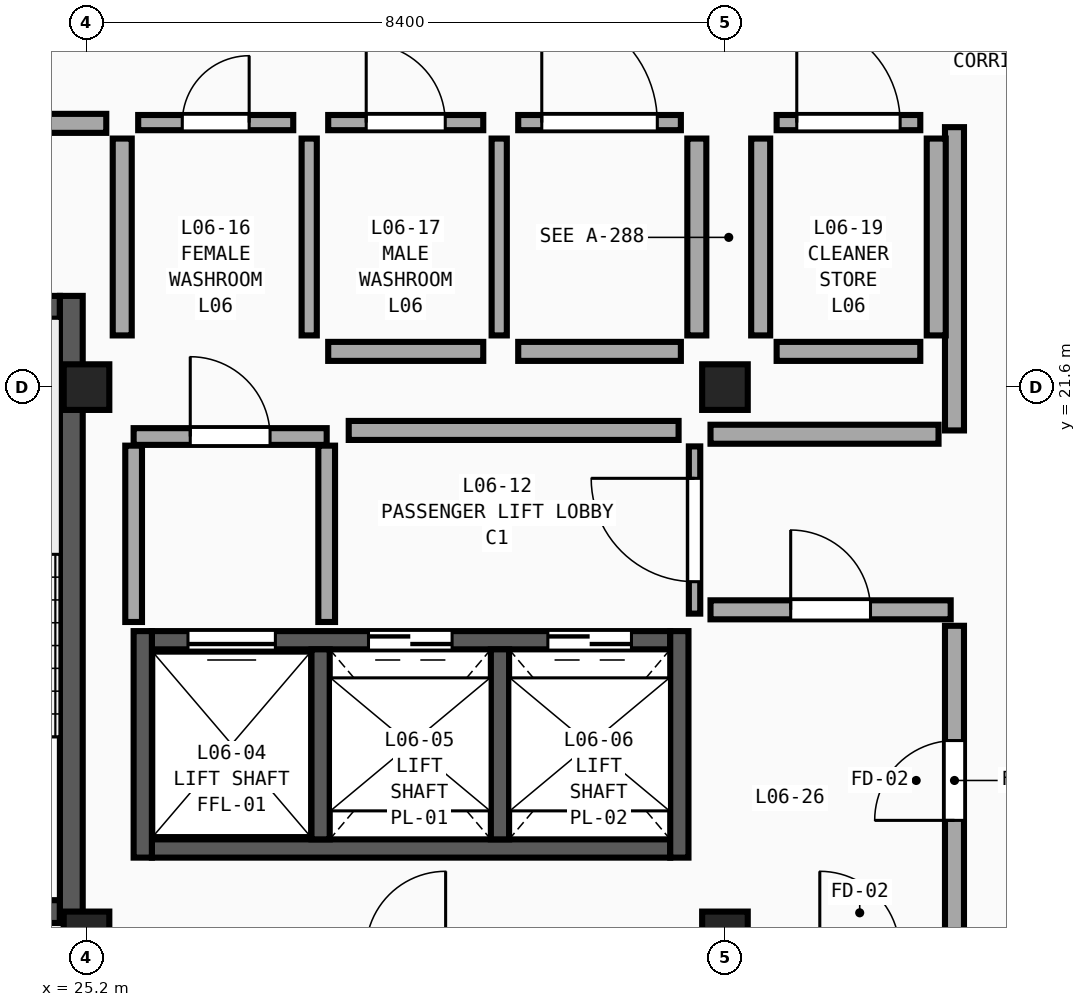
"""IFC4 building model, lengths in metres.
Left out: names, types, materials, properties, quantities, classifications, styles, units other than length and angle.
Written with IfcOpenShell. Run it as: python <this file> out.ifc"""

import sys

from ifc_helpers import new_model, si_unit, direction, frame, frame_2d, origin, origin_2d, place, context, subcontext, project, spatial, rectangle, extrude, element, fill, save


model = new_model("IFC4")
c1 = context("Model", 3, precision=1e-05, world=origin(), true_north=direction((0.0, 1.0)))
c2 = subcontext(c1, "Body", "Model", "MODEL_VIEW")
j1 = project(units=[si_unit("LENGTHUNIT", "METRE"), si_unit("PLANEANGLEUNIT", "RADIAN")], contexts=[c1])
p1 = place(None, origin())
s1 = spatial("IfcSite", under=j1, at=p1, CompositionType="ELEMENT")
p2 = place(p1, origin())
s2 = spatial("IfcBuilding", under=s1, at=p2, CompositionType="ELEMENT")
p3 = place(p2, frame((0.0, 0.0, 27.9)))
s3 = spatial("IfcBuildingStorey", under=s2, at=p3, CompositionType="ELEMENT", Elevation=27.9)
for number, where, z_axis, x_axis in (
    (1, (25.2, 14.4, 0.0), (0.0, 0.0, 1.0), (1.0, 0.0, 0.0)),
    (2, (25.2, 21.6, 0.0), (0.0, 0.0, 1.0), (1.0, 0.0, 0.0)),
    (3, (33.6, 14.4, 0.0), (0.0, 0.0, 1.0), (1.0, 0.0, 0.0)),
    (4, (33.6, 21.6, 0.0), (0.0, 0.0, 1.0), (1.0, 0.0, 0.0)),
):
    element("IfcColumn", number, at=place(p3, frame(where, z_axis=z_axis, x_axis=x_axis)), inside=s3, PredefinedType="COLUMN", context=c2, shape_type="SweptSolid", body=[
        extrude(rectangle(XDim=0.6, YDim=0.6, at=origin_2d()), origin(), (0.0, 0.0, 1.0), 4.2),
    ])
p4 = place(p3, frame((24.85, 14.7, 0.0), z_axis=(0.0, 0.0, 1.0), x_axis=(-1.0, 0.0, 0.0)))
e5 = element("IfcWall", 5, at=p4, inside=s3, PredefinedType="SHEAR", context=c2, shape_type="SweptSolid", body=[
    extrude(rectangle(XDim=7.7, YDim=0.3, at=frame_2d((3.85, 0.0))), origin(), (0.0, 0.0, 1.0), 4.2),
])
p5 = place(p4, frame((3.3, 0.0, 0.0)))
e6 = element("IfcOpeningElement", 6, at=p5, cuts=e5, PredefinedType="OPENING", context=c2, shape_type="SweptSolid", body=[
    extrude(rectangle(XDim=1.1, YDim=2.2, at=frame_2d((0.55, 1.1))), frame((0.0, 0.17, 0.0), z_axis=(0.0, -1.0, 0.0), x_axis=(1.0, 0.0, 0.0)), (0.0, 0.0, 1.0), 0.34),
])
p6 = place(p3, frame((17.15, 22.65, 0.0), z_axis=(0.0, 0.0, 1.0), x_axis=(1.0, 0.0, 0.0)))
e7 = element("IfcWall", 7, at=p6, inside=s3, PredefinedType="SHEAR", context=c2, shape_type="SweptSolid", body=[
    extrude(rectangle(XDim=7.7, YDim=0.3, at=frame_2d((3.85, 0.0))), origin(), (0.0, 0.0, 1.0), 4.2),
])
p7 = place(p3, frame((25.0, 14.55, 0.0), z_axis=(0.0, 0.0, 1.0), x_axis=(0.0, 1.0, 0.0)))
e8 = element("IfcWall", 8, at=p7, inside=s3, PredefinedType="SHEAR", context=c2, shape_type="SweptSolid", body=[
    extrude(rectangle(XDim=8.25, YDim=0.3, at=frame_2d((4.125, 0.0))), origin(), (0.0, 0.0, 1.0), 4.2),
])
p8 = place(p3, frame((32.88, 18.27, 0.0), z_axis=(0.0, 0.0, 1.0), x_axis=(-1.0, 0.0, 0.0)))
e9 = element("IfcWall", 9, at=p8, inside=s3, PredefinedType="SHEAR", context=c2, shape_type="SweptSolid", body=[
    extrude(rectangle(XDim=6.82, YDim=0.24, at=frame_2d((3.41, 0.0))), origin(), (0.0, 0.0, 1.0), 3.91),
])
p9 = place(p8, frame((5.195, 0.0, 0.0)))
e10 = element("IfcOpeningElement", 10, at=p9, cuts=e9, PredefinedType="OPENING", context=c2, shape_type="SweptSolid", body=[
    extrude(rectangle(XDim=1.15, YDim=2.25, at=frame_2d((0.575, 1.125))), frame((0.0, 0.14, 0.0), z_axis=(0.0, -1.0, 0.0), x_axis=(1.0, 0.0, 0.0)), (0.0, 0.0, 1.0), 0.28),
])
p10 = place(p8, frame((2.87, 0.0, 0.0)))
e11 = element("IfcOpeningElement", 11, at=p10, cuts=e9, PredefinedType="OPENING", context=c2, shape_type="SweptSolid", body=[
    extrude(rectangle(XDim=1.1, YDim=2.2, at=frame_2d((0.55, 1.1))), frame((0.0, 0.14, 0.0), z_axis=(0.0, -1.0, 0.0), x_axis=(1.0, 0.0, 0.0)), (0.0, 0.0, 1.0), 0.28),
])
p11 = place(p8, frame((0.51, 0.0, 0.0)))
e12 = element("IfcOpeningElement", 12, at=p11, cuts=e9, PredefinedType="OPENING", context=c2, shape_type="SweptSolid", body=[
    extrude(rectangle(XDim=1.1, YDim=2.2, at=frame_2d((0.55, 1.1))), frame((0.0, 0.14, 0.0), z_axis=(0.0, -1.0, 0.0), x_axis=(1.0, 0.0, 0.0)), (0.0, 0.0, 1.0), 0.28),
])
p12 = place(p3, frame((26.06, 15.53, 0.0), z_axis=(0.0, 0.0, 1.0), x_axis=(1.0, 0.0, 0.0)))
e13 = element("IfcWall", 13, at=p12, inside=s3, PredefinedType="SHEAR", context=c2, shape_type="SweptSolid", body=[
    extrude(rectangle(XDim=6.82, YDim=0.24, at=frame_2d((3.41, 0.0))), origin(), (0.0, 0.0, 1.0), 3.91),
])
for number, where, z_axis, x_axis in (
    (14, (25.94, 18.39, 0.0), (0.0, 0.0, 1.0), (0.0, -1.0, 0.0)),
    (15, (33.0, 15.41, 0.0), (0.0, 0.0, 1.0), (0.0, 1.0, 0.0)),
):
    element("IfcWall", number, at=place(p3, frame(where, z_axis=z_axis, x_axis=x_axis)), inside=s3, PredefinedType="SHEAR", context=c2, shape_type="SweptSolid", body=[
        extrude(rectangle(XDim=2.98, YDim=0.24, at=frame_2d((1.49, 0.0))), origin(), (0.0, 0.0, 1.0), 3.91),
    ])
for number, where, z_axis, x_axis in (
    (16, (28.28, 15.65, 0.0), (0.0, 0.0, 1.0), (0.0, 1.0, 0.0)),
    (17, (30.64, 15.65, 0.0), (0.0, 0.0, 1.0), (0.0, 1.0, 0.0)),
):
    element("IfcWall", number, at=place(p3, frame(where, z_axis=z_axis, x_axis=x_axis)), inside=s3, PredefinedType="SHEAR", context=c2, shape_type="SweptSolid", body=[
        extrude(rectangle(XDim=2.5, YDim=0.24, at=frame_2d((1.25, 0.0))), origin(), (0.0, 0.0, 1.0), 3.91),
    ])
p13 = place(p3, frame((25.82, 20.95, 0.0), z_axis=(0.0, 0.0, 1.0), x_axis=(1.0, 0.0, 0.0)))
e18 = element("IfcWall", 18, at=p13, inside=s3, PredefinedType="SOLIDWALL", context=c2, shape_type="SweptSolid", body=[
    extrude(rectangle(XDim=2.54, YDim=0.22, at=frame_2d((1.27, 0.0))), origin(), (0.0, 0.0, 1.0), 3.46),
])
p14 = place(p13, frame((0.745, 0.0, 0.0)))
e19 = element("IfcOpeningElement", 19, at=p14, cuts=e18, PredefinedType="OPENING", context=c2, shape_type="SweptSolid", body=[
    extrude(rectangle(XDim=1.05, YDim=2.15, at=frame_2d((0.525, 1.075))), frame((0.0, 0.13, 0.0), z_axis=(0.0, -1.0, 0.0), x_axis=(1.0, 0.0, 0.0)), (0.0, 0.0, 1.0), 0.26),
])
for number, where, z_axis, x_axis in (
    (20, (25.82, 18.51, 0.0), (0.0, 0.0, 1.0), (0.0, 1.0, 0.0)),
    (21, (28.36, 18.51, 0.0), (0.0, 0.0, 1.0), (0.0, 1.0, 0.0)),
):
    element("IfcWall", number, at=place(p3, frame(where, z_axis=z_axis, x_axis=x_axis)), inside=s3, PredefinedType="SOLIDWALL", context=c2, shape_type="SweptSolid", body=[
        extrude(rectangle(XDim=2.32, YDim=0.22, at=frame_2d((1.16, 0.0))), origin(), (0.0, 0.0, 1.0), 3.91),
    ])
p15 = place(p3, frame((28.65, 21.03, 0.0), z_axis=(0.0, 0.0, 1.0), x_axis=(1.0, 0.0, 0.0)))
e22 = element("IfcWall", 22, at=p15, inside=s3, PredefinedType="SOLIDWALL", context=c2, shape_type="SweptSolid", body=[
    extrude(rectangle(XDim=4.34, YDim=0.25, at=frame_2d((2.17, 0.0))), origin(), (0.0, 0.0, 1.0), 3.46),
])
p16 = place(p3, frame((36.62, 14.39, 0.0), z_axis=(0.0, 0.0, 1.0), x_axis=(0.0, 1.0, 0.0)))
e23 = element("IfcWall", 23, at=p16, inside=s3, PredefinedType="SOLIDWALL", context=c2, shape_type="SweptSolid", body=[
    extrude(rectangle(XDim=4.07, YDim=0.25, at=frame_2d((2.035, 0.0))), origin(), (0.0, 0.0, 1.0), 3.91),
])
p17 = place(p16, frame((1.51, 0.0, 0.0)))
e24 = element("IfcOpeningElement", 24, at=p17, cuts=e23, PredefinedType="OPENING", context=c2, shape_type="SweptSolid", body=[
    extrude(rectangle(XDim=1.05, YDim=2.15, at=frame_2d((0.525, 1.075))), frame((0.0, 0.145, 0.0), z_axis=(0.0, -1.0, 0.0), x_axis=(1.0, 0.0, 0.0)), (0.0, 0.0, 1.0), 0.29),
])
p18 = place(p3, frame((36.62, 21.03, 0.0), z_axis=(0.0, 0.0, 1.0), x_axis=(0.0, 1.0, 0.0)))
e25 = element("IfcWall", 25, at=p18, inside=s3, PredefinedType="SOLIDWALL", context=c2, shape_type="SweptSolid", body=[
    extrude(rectangle(XDim=3.99, YDim=0.25, at=frame_2d((1.995, 0.0))), origin(), (0.0, 0.0, 1.0), 3.91),
])
p19 = place(p3, frame((22.24, 25.07, 0.0), z_axis=(0.0, 0.0, 1.0), x_axis=(1.0, 0.0, 0.0)))
e26 = element("IfcWall", 26, at=p19, inside=s3, PredefinedType="SOLIDWALL", context=c2, shape_type="SweptSolid", body=[
    extrude(rectangle(XDim=3.22, YDim=0.25, at=frame_2d((1.61, 0.0))), origin(), (0.0, 0.0, 1.0), 3.91),
])
p20 = place(p19, frame((1.085, 0.0, 0.0)))
e27 = element("IfcOpeningElement", 27, at=p20, cuts=e26, PredefinedType="OPENING", context=c2, shape_type="SweptSolid", body=[
    extrude(rectangle(XDim=1.05, YDim=2.15, at=frame_2d((0.525, 1.075))), frame((0.0, 0.145, 0.0), z_axis=(0.0, -1.0, 0.0), x_axis=(1.0, 0.0, 0.0)), (0.0, 0.0, 1.0), 0.29),
])
p21 = place(p3, frame((33.41, 18.67, 0.0), z_axis=(0.0, 0.0, 1.0), x_axis=(1.0, 0.0, 0.0)))
e28 = element("IfcWall", 28, at=p21, inside=s3, PredefinedType="SOLIDWALL", context=c2, shape_type="SweptSolid", body=[
    extrude(rectangle(XDim=3.16, YDim=0.25, at=frame_2d((1.58, 0.0))), origin(), (0.0, 0.0, 1.0), 3.91),
])
p22 = place(p21, frame((1.055, 0.0, 0.0)))
e29 = element("IfcOpeningElement", 29, at=p22, cuts=e28, PredefinedType="OPENING", context=c2, shape_type="SweptSolid", body=[
    extrude(rectangle(XDim=1.05, YDim=2.15, at=frame_2d((0.525, 1.075))), frame((0.0, 0.145, 0.0), z_axis=(0.0, -1.0, 0.0), x_axis=(1.0, 0.0, 0.0)), (0.0, 0.0, 1.0), 0.29),
])
p23 = place(p3, frame((33.41, 20.98, 0.0), z_axis=(0.0, 0.0, 1.0), x_axis=(1.0, 0.0, 0.0)))
e30 = element("IfcWall", 30, at=p23, inside=s3, PredefinedType="SOLIDWALL", context=c2, shape_type="SweptSolid", body=[
    extrude(rectangle(XDim=3.0, YDim=0.25, at=frame_2d((1.5, 0.0))), origin(), (0.0, 0.0, 1.0), 3.46),
])
p24 = place(p3, frame((33.2, 18.62, 0.0), z_axis=(0.0, 0.0, 1.0), x_axis=(0.0, 1.0, 0.0)))
e31 = element("IfcWall", 31, at=p24, inside=s3, PredefinedType="PARTITIONING", context=c2, shape_type="SweptSolid", body=[
    extrude(rectangle(XDim=2.2, YDim=0.15, at=frame_2d((1.1, 0.0))), origin(), (0.0, 0.0, 1.0), 3.46),
])
p25 = place(p24, frame((0.42, 0.0, 0.0)))
e32 = element("IfcOpeningElement", 32, at=p25, cuts=e31, PredefinedType="OPENING", context=c2, shape_type="SweptSolid", body=[
    extrude(rectangle(XDim=1.36, YDim=2.29, at=frame_2d((0.68, 1.145))), frame((0.0, 0.095, 0.0), z_axis=(0.0, -1.0, 0.0), x_axis=(1.0, 0.0, 0.0)), (0.0, 0.0, 1.0), 0.19),
])
p26 = place(p3, frame((30.88, 25.08, 0.0), z_axis=(0.0, 0.0, 1.0), x_axis=(1.0, 0.0, 0.0)))
e33 = element("IfcWall", 33, at=p26, inside=s3, PredefinedType="PLUMBINGWALL", context=c2, shape_type="SweptSolid", body=[
    extrude(rectangle(XDim=2.14, YDim=0.2, at=frame_2d((1.07, 0.0))), origin(), (0.0, 0.0, 1.0), 3.91),
])
p27 = place(p26, frame((0.31, 0.0, 0.0)))
e34 = element("IfcOpeningElement", 34, at=p27, cuts=e33, PredefinedType="OPENING", context=c2, shape_type="SweptSolid", body=[
    extrude(rectangle(XDim=1.52, YDim=2.29, at=frame_2d((0.76, 1.145))), frame((0.0, 0.12, 0.0), z_axis=(0.0, -1.0, 0.0), x_axis=(1.0, 0.0, 0.0)), (0.0, 0.0, 1.0), 0.24),
])
p28 = place(p3, frame((25.88, 25.08, 0.0), z_axis=(0.0, 0.0, 1.0), x_axis=(1.0, 0.0, 0.0)))
e35 = element("IfcWall", 35, at=p28, inside=s3, PredefinedType="PLUMBINGWALL", context=c2, shape_type="SweptSolid", body=[
    extrude(rectangle(XDim=2.04, YDim=0.2, at=frame_2d((1.02, 0.0))), origin(), (0.0, 0.0, 1.0), 3.91),
])
p29 = place(p28, frame((0.58, 0.0, 0.0)))
e36 = element("IfcOpeningElement", 36, at=p29, cuts=e35, PredefinedType="OPENING", context=c2, shape_type="SweptSolid", body=[
    extrude(rectangle(XDim=0.88, YDim=2.37, at=frame_2d((0.44, 1.185))), frame((0.0, 0.12, 0.0), z_axis=(0.0, -1.0, 0.0), x_axis=(1.0, 0.0, 0.0)), (0.0, 0.0, 1.0), 0.24),
])
p30 = place(p3, frame((28.38, 25.08, 0.0), z_axis=(0.0, 0.0, 1.0), x_axis=(1.0, 0.0, 0.0)))
e37 = element("IfcWall", 37, at=p30, inside=s3, PredefinedType="PLUMBINGWALL", context=c2, shape_type="SweptSolid", body=[
    extrude(rectangle(XDim=2.04, YDim=0.2, at=frame_2d((1.02, 0.0))), origin(), (0.0, 0.0, 1.0), 3.91),
])
p31 = place(p30, frame((0.5, 0.0, 0.0)))
e38 = element("IfcOpeningElement", 38, at=p31, cuts=e37, PredefinedType="OPENING", context=c2, shape_type="SweptSolid", body=[
    extrude(rectangle(XDim=1.04, YDim=2.37, at=frame_2d((0.52, 1.185))), frame((0.0, 0.12, 0.0), z_axis=(0.0, -1.0, 0.0), x_axis=(1.0, 0.0, 0.0)), (0.0, 0.0, 1.0), 0.24),
])
p32 = place(p3, frame((34.28, 25.08, 0.0), z_axis=(0.0, 0.0, 1.0), x_axis=(1.0, 0.0, 0.0)))
e39 = element("IfcWall", 39, at=p32, inside=s3, PredefinedType="PLUMBINGWALL", context=c2, shape_type="SweptSolid", body=[
    extrude(rectangle(XDim=1.89, YDim=0.2, at=frame_2d((0.945, 0.0))), origin(), (0.0, 0.0, 1.0), 3.91),
])
p33 = place(p32, frame((0.265, 0.0, 0.0)))
e40 = element("IfcOpeningElement", 40, at=p33, cuts=e39, PredefinedType="OPENING", context=c2, shape_type="SweptSolid", body=[
    extrude(rectangle(XDim=1.36, YDim=2.37, at=frame_2d((0.68, 1.185))), frame((0.0, 0.12, 0.0), z_axis=(0.0, -1.0, 0.0), x_axis=(1.0, 0.0, 0.0)), (0.0, 0.0, 1.0), 0.24),
])
p34 = place(p3, frame((28.13, 22.28, 0.0), z_axis=(0.0, 0.0, 1.0), x_axis=(0.0, 1.0, 0.0)))
e41 = element("IfcWall", 41, at=p34, inside=s3, PredefinedType="PLUMBINGWALL", context=c2, shape_type="SweptSolid", body=[
    extrude(rectangle(XDim=2.59, YDim=0.2, at=frame_2d((1.295, 0.0))), origin(), (0.0, 0.0, 1.0), 3.91),
])
p35 = place(p3, frame((25.67, 22.28, 0.0), z_axis=(0.0, 0.0, 1.0), x_axis=(0.0, 1.0, 0.0)))
e42 = element("IfcWall", 42, at=p35, inside=s3, PredefinedType="SOLIDWALL", context=c2, shape_type="SweptSolid", body=[
    extrude(rectangle(XDim=2.59, YDim=0.25, at=frame_2d((1.295, 0.0))), origin(), (0.0, 0.0, 1.0), 3.91),
])
p36 = place(p3, frame((30.63, 22.28, 0.0), z_axis=(0.0, 0.0, 1.0), x_axis=(0.0, 1.0, 0.0)))
e43 = element("IfcWall", 43, at=p36, inside=s3, PredefinedType="PLUMBINGWALL", context=c2, shape_type="SweptSolid", body=[
    extrude(rectangle(XDim=2.59, YDim=0.2, at=frame_2d((1.295, 0.0))), origin(), (0.0, 0.0, 1.0), 3.91),
])
p37 = place(p3, frame((33.23, 22.28, 0.0), z_axis=(0.0, 0.0, 1.0), x_axis=(0.0, 1.0, 0.0)))
e44 = element("IfcWall", 44, at=p37, inside=s3, PredefinedType="SOLIDWALL", context=c2, shape_type="SweptSolid", body=[
    extrude(rectangle(XDim=2.59, YDim=0.25, at=frame_2d((1.295, 0.0))), origin(), (0.0, 0.0, 1.0), 3.46),
])
p38 = place(p3, frame((36.38, 22.28, 0.0), z_axis=(0.0, 0.0, 1.0), x_axis=(0.0, 1.0, 0.0)))
e45 = element("IfcWall", 45, at=p38, inside=s3, PredefinedType="SOLIDWALL", context=c2, shape_type="SweptSolid", body=[
    extrude(rectangle(XDim=2.59, YDim=0.25, at=frame_2d((1.295, 0.0))), origin(), (0.0, 0.0, 1.0), 3.91),
])
p39 = place(p3, frame((34.07, 22.28, 0.0), z_axis=(0.0, 0.0, 1.0), x_axis=(0.0, 1.0, 0.0)))
e46 = element("IfcWall", 46, at=p39, inside=s3, PredefinedType="SOLIDWALL", context=c2, shape_type="SweptSolid", body=[
    extrude(rectangle(XDim=2.59, YDim=0.25, at=frame_2d((1.295, 0.0))), origin(), (0.0, 0.0, 1.0), 3.46),
])
p40 = place(p3, frame((30.88, 22.07, 0.0), z_axis=(0.0, 0.0, 1.0), x_axis=(1.0, 0.0, 0.0)))
e47 = element("IfcWall", 47, at=p40, inside=s3, PredefinedType="SOLIDWALL", context=c2, shape_type="SweptSolid", body=[
    extrude(rectangle(XDim=2.14, YDim=0.25, at=frame_2d((1.07, 0.0))), origin(), (0.0, 0.0, 1.0), 3.46),
])
p41 = place(p3, frame((28.38, 22.07, 0.0), z_axis=(0.0, 0.0, 1.0), x_axis=(1.0, 0.0, 0.0)))
e48 = element("IfcWall", 48, at=p41, inside=s3, PredefinedType="SOLIDWALL", context=c2, shape_type="SweptSolid", body=[
    extrude(rectangle(XDim=2.04, YDim=0.25, at=frame_2d((1.02, 0.0))), origin(), (0.0, 0.0, 1.0), 3.46),
])
p42 = place(p3, frame((34.28, 22.07, 0.0), z_axis=(0.0, 0.0, 1.0), x_axis=(1.0, 0.0, 0.0)))
e49 = element("IfcWall", 49, at=p42, inside=s3, PredefinedType="SOLIDWALL", context=c2, shape_type="SweptSolid", body=[
    extrude(rectangle(XDim=1.89, YDim=0.25, at=frame_2d((0.945, 0.0))), origin(), (0.0, 0.0, 1.0), 3.46),
])
p43 = place(p9, origin())
e50 = element("IfcDoor", 50, at=p43, inside=s3, OperationType="SLIDING_TO_LEFT", PredefinedType="DOOR", context=c2, shape_type="SweptSolid", body=[
    extrude(rectangle(XDim=1.15, YDim=2.25, at=frame_2d((0.575, 1.125))), frame((0.0, 0.025, 0.0), z_axis=(0.0, -1.0, 0.0), x_axis=(1.0, 0.0, 0.0)), (0.0, 0.0, 1.0), 0.05),
])
fill(e10, e50)
p44 = place(p10, origin())
e51 = element("IfcDoor", 51, at=p44, inside=s3, OperationType="DOUBLE_DOOR_SLIDING", PredefinedType="DOOR", context=c2, shape_type="SweptSolid", body=[
    extrude(rectangle(XDim=1.1, YDim=2.2, at=frame_2d((0.55, 1.1))), frame((0.0, 0.025, 0.0), z_axis=(0.0, -1.0, 0.0), x_axis=(1.0, 0.0, 0.0)), (0.0, 0.0, 1.0), 0.05),
])
fill(e11, e51)
p45 = place(p11, origin())
e52 = element("IfcDoor", 52, at=p45, inside=s3, OperationType="DOUBLE_DOOR_SLIDING", PredefinedType="DOOR", context=c2, shape_type="SweptSolid", body=[
    extrude(rectangle(XDim=1.1, YDim=2.2, at=frame_2d((0.55, 1.1))), frame((0.0, 0.025, 0.0), z_axis=(0.0, -1.0, 0.0), x_axis=(1.0, 0.0, 0.0)), (0.0, 0.0, 1.0), 0.05),
])
fill(e12, e52)
p46 = place(p14, origin())
e53 = element("IfcDoor", 53, at=p46, inside=s3, OperationType="SINGLE_SWING_LEFT", PredefinedType="DOOR", context=c2, shape_type="SweptSolid", body=[
    extrude(rectangle(XDim=1.05, YDim=2.15, at=frame_2d((0.525, 1.075))), frame((0.0, 0.025, 0.0), z_axis=(0.0, -1.0, 0.0), x_axis=(1.0, 0.0, 0.0)), (0.0, 0.0, 1.0), 0.05),
])
fill(e19, e53)
p47 = place(p17, origin())
e54 = element("IfcDoor", 54, at=p47, inside=s3, OperationType="SINGLE_SWING_LEFT", PredefinedType="DOOR", context=c2, shape_type="SweptSolid", body=[
    extrude(rectangle(XDim=1.05, YDim=2.15, at=frame_2d((0.525, 1.075))), frame((0.0, 0.025, 0.0), z_axis=(0.0, -1.0, 0.0), x_axis=(1.0, 0.0, 0.0)), (0.0, 0.0, 1.0), 0.05),
])
fill(e24, e54)
p48 = place(p22, origin())
e55 = element("IfcDoor", 55, at=p48, inside=s3, OperationType="SINGLE_SWING_LEFT", PredefinedType="DOOR", context=c2, shape_type="SweptSolid", body=[
    extrude(rectangle(XDim=1.05, YDim=2.15, at=frame_2d((0.525, 1.075))), frame((0.0, 0.025, 0.0), z_axis=(0.0, -1.0, 0.0), x_axis=(1.0, 0.0, 0.0)), (0.0, 0.0, 1.0), 0.05),
])
fill(e29, e55)
p49 = place(p25, origin())
e56 = element("IfcDoor", 56, at=p49, inside=s3, OperationType="SINGLE_SWING_RIGHT", PredefinedType="DOOR", context=c2, shape_type="SweptSolid", body=[
    extrude(rectangle(XDim=1.36, YDim=2.29, at=frame_2d((0.68, 1.145))), frame((0.0, 0.025, 0.0), z_axis=(0.0, -1.0, 0.0), x_axis=(1.0, 0.0, 0.0)), (0.0, 0.0, 1.0), 0.05),
])
fill(e32, e56)
p50 = place(p27, origin())
e57 = element("IfcDoor", 57, at=p50, inside=s3, OperationType="SINGLE_SWING_LEFT", PredefinedType="DOOR", context=c2, shape_type="SweptSolid", body=[
    extrude(rectangle(XDim=1.52, YDim=2.29, at=frame_2d((0.76, 1.145))), frame((0.0, 0.025, 0.0), z_axis=(0.0, -1.0, 0.0), x_axis=(1.0, 0.0, 0.0)), (0.0, 0.0, 1.0), 0.05),
])
fill(e34, e57)
p51 = place(p29, origin())
e58 = element("IfcDoor", 58, at=p51, inside=s3, OperationType="SINGLE_SWING_RIGHT", PredefinedType="DOOR", context=c2, shape_type="SweptSolid", body=[
    extrude(rectangle(XDim=0.88, YDim=2.37, at=frame_2d((0.44, 1.185))), frame((0.0, 0.025, 0.0), z_axis=(0.0, -1.0, 0.0), x_axis=(1.0, 0.0, 0.0)), (0.0, 0.0, 1.0), 0.05),
])
fill(e36, e58)
p52 = place(p31, origin())
e59 = element("IfcDoor", 59, at=p52, inside=s3, OperationType="SINGLE_SWING_LEFT", PredefinedType="DOOR", context=c2, shape_type="SweptSolid", body=[
    extrude(rectangle(XDim=1.04, YDim=2.37, at=frame_2d((0.52, 1.185))), frame((0.0, 0.025, 0.0), z_axis=(0.0, -1.0, 0.0), x_axis=(1.0, 0.0, 0.0)), (0.0, 0.0, 1.0), 0.05),
])
fill(e38, e59)
p53 = place(p33, origin())
e60 = element("IfcDoor", 60, at=p53, inside=s3, OperationType="SINGLE_SWING_LEFT", PredefinedType="DOOR", context=c2, shape_type="SweptSolid", body=[
    extrude(rectangle(XDim=1.36, YDim=2.37, at=frame_2d((0.68, 1.185))), frame((0.0, 0.025, 0.0), z_axis=(0.0, -1.0, 0.0), x_axis=(1.0, 0.0, 0.0)), (0.0, 0.0, 1.0), 0.05),
])
fill(e40, e60)
save(model, sys.argv[1])
